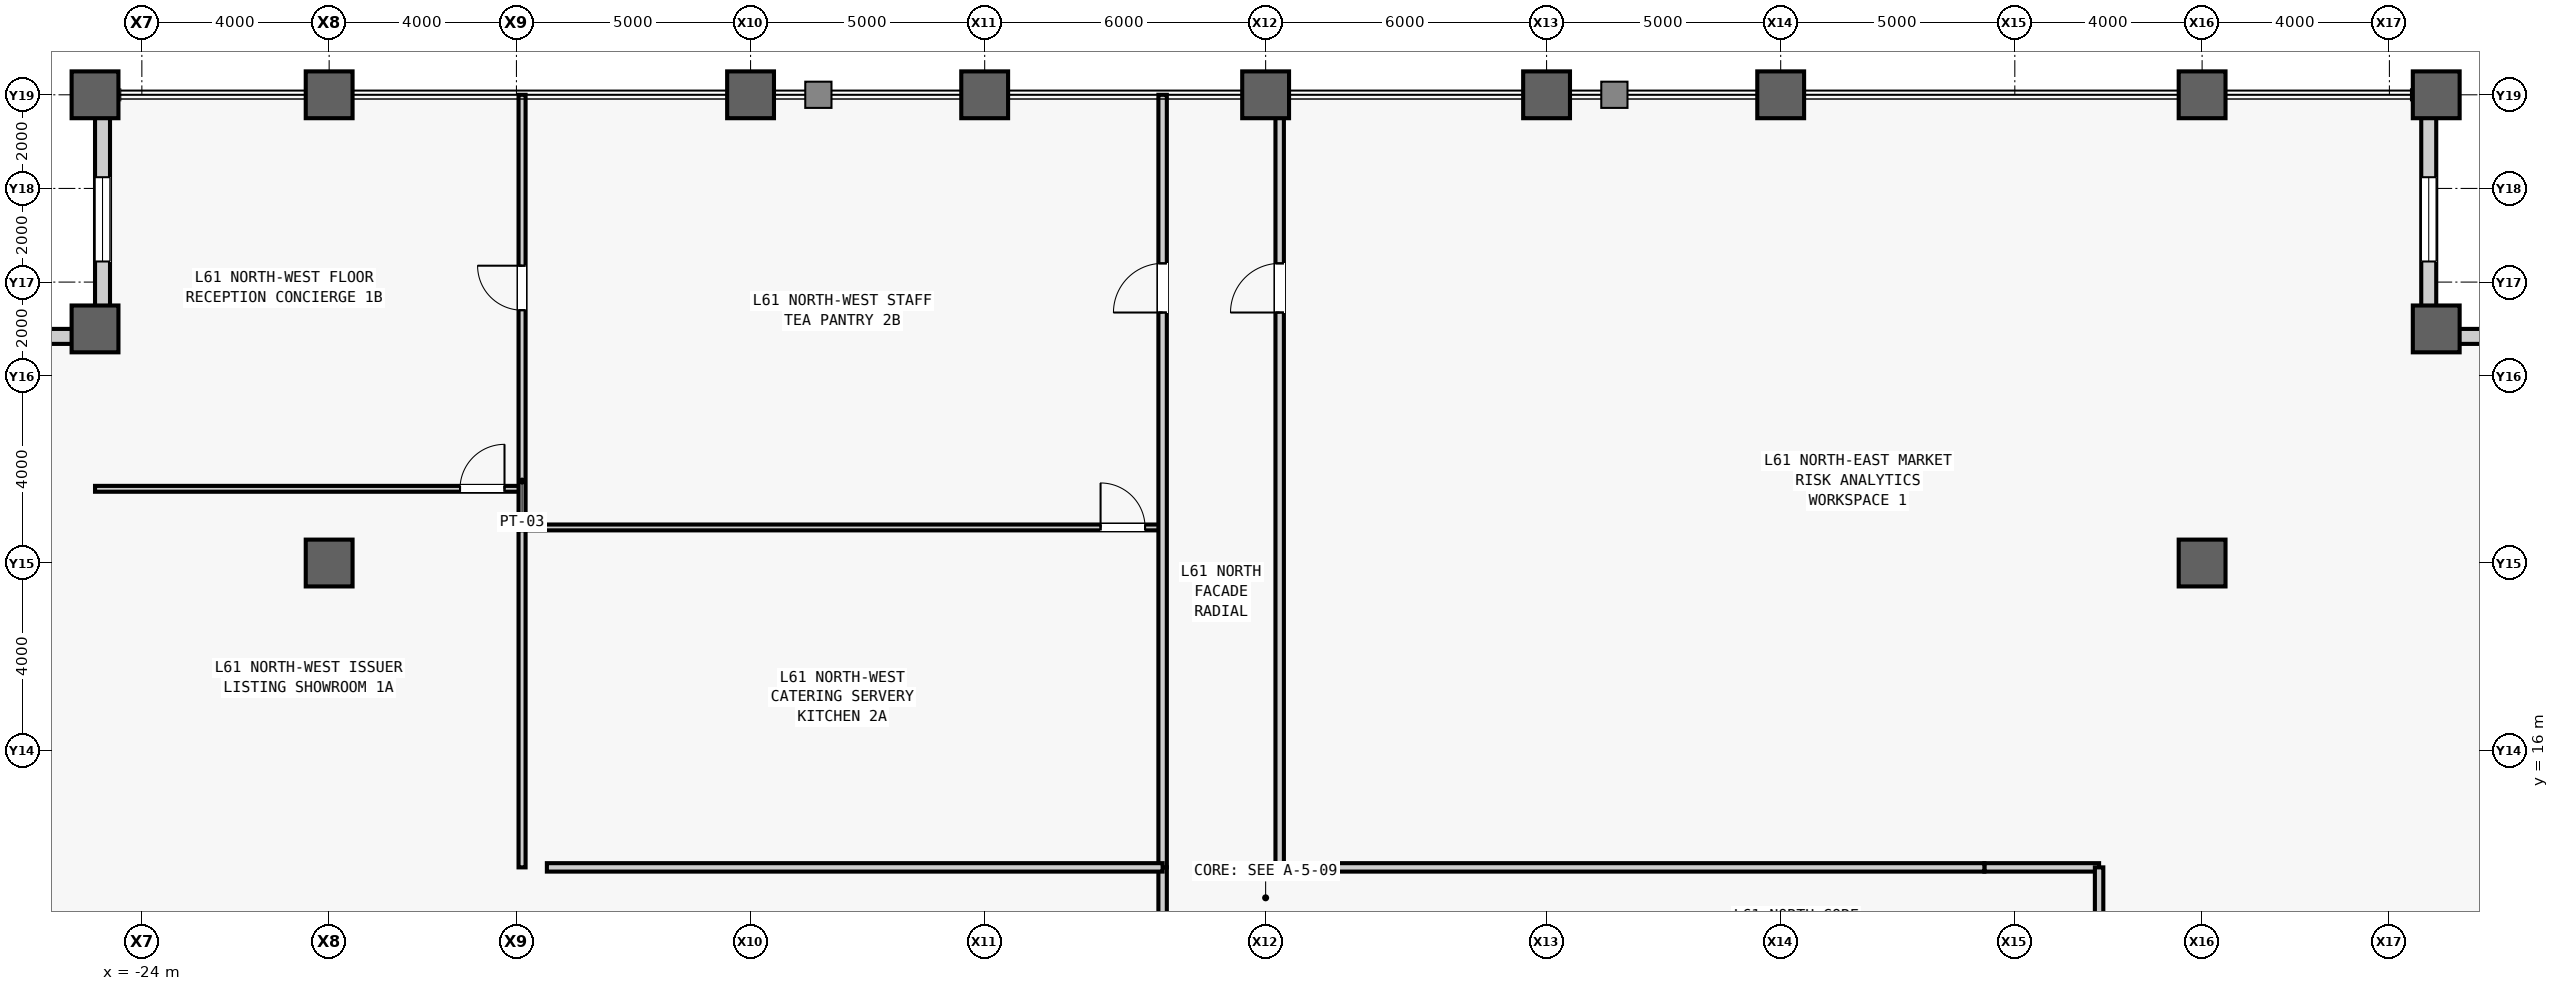
"""IFC4 building model, lengths in metres.
Left out: names, types, materials, properties, quantities, classifications, styles, units other than length and angle.
Written with IfcOpenShell. Run it as: python <this file> out.ifc"""

import sys

from ifc_helpers import new_model, si_unit, direction, frame, frame_2d, origin, origin_2d, place, context, subcontext, project, spatial, rectangle, hollow_rectangle, extrude, source, transform, mapped, element, fill, save


model = new_model("IFC4")
c1 = context("Model", 3, precision=1e-05, world=origin(), true_north=direction((0.0, 1.0)))
c2 = subcontext(c1, "Body", "Model", "MODEL_VIEW")
j1 = project(units=[si_unit("LENGTHUNIT", "METRE"), si_unit("PLANEANGLEUNIT", "RADIAN")], contexts=[c1])
p1 = place(None, origin())
s1 = spatial("IfcSite", under=j1, at=p1, CompositionType="ELEMENT")
p2 = place(p1, origin())
s2 = spatial("IfcBuilding", under=s1, at=p2, CompositionType="ELEMENT")
p3 = place(p2, frame((0.0, 0.0, 259.1)))
s3 = spatial("IfcBuildingStorey", under=s2, at=p3, CompositionType="ELEMENT", Elevation=259.1)
m1 = source(origin(), c2, "Body", "SweptSolid", [
    extrude(hollow_rectangle(XDim=1.0, YDim=1.0, WallThickness=0.055, at=origin_2d()), origin(), (0.0, 0.0, 1.0), 4.0),
])
for number, where, z_axis, x_axis in (
    (1, (-25.0, 25.0, 0.0), (0.0, 0.0, 1.0), (1.0, 0.0, 0.0)),
    (2, (-25.0, 30.0, 0.0), (0.0, 0.0, 1.0), (1.0, 0.0, 0.0)),
    (3, (-20.0, 20.0, 0.0), (0.0, 0.0, 1.0), (1.0, 0.0, 0.0)),
    (4, (-20.0, 30.0, 0.0), (0.0, 0.0, 1.0), (1.0, 0.0, 0.0)),
    (5, (-11.0, 30.0, 0.0), (0.0, 0.0, 1.0), (1.0, 0.0, 0.0)),
    (6, (-6.0, 30.0, 0.0), (0.0, 0.0, 1.0), (1.0, 0.0, 0.0)),
    (7, (0.0, 30.0, 0.0), (0.0, 0.0, 1.0), (1.0, 0.0, 0.0)),
    (8, (6.0, 30.0, 0.0), (0.0, 0.0, 1.0), (1.0, 0.0, 0.0)),
    (9, (11.0, 30.0, 0.0), (0.0, 0.0, 1.0), (1.0, 0.0, 0.0)),
    (10, (20.0, 20.0, 0.0), (0.0, 0.0, 1.0), (1.0, 0.0, 0.0)),
    (11, (20.0, 30.0, 0.0), (0.0, 0.0, 1.0), (1.0, 0.0, 0.0)),
    (12, (25.0, 25.0, 0.0), (0.0, 0.0, 1.0), (1.0, 0.0, 0.0)),
    (13, (25.0, 30.0, 0.0), (0.0, 0.0, 1.0), (1.0, 0.0, 0.0)),
):
    element("IfcColumn", number, at=place(p3, frame(where, z_axis=z_axis, x_axis=x_axis)), inside=s3, PredefinedType="COLUMN", context=c2, shape_type="MappedRepresentation", body=[
        mapped(m1, transform((0.0, 0.0, 0.0), scale=1.0)),
    ])
m2 = source(origin(), c2, "Body", "SweptSolid", [
    extrude(rectangle(XDim=4.68, YDim=0.32, at=frame_2d((2.34, 0.0))), origin(), (0.0, 0.0, 1.0), 3.164),
])
p4 = place(p3, frame((25.0, 24.84, 0.0), z_axis=(0.0, 0.0, 1.0), x_axis=(1.0, 0.0, 0.0)))
e14 = element("IfcWall", 14, at=p4, inside=s3, PredefinedType="STANDARD", context=c2, shape_type="MappedRepresentation", body=[
    mapped(m2, transform((0.0, 0.0, 0.0), scale=1.0)),
])
m3 = source(origin(), c2, "Body", "SweptSolid", [
    extrude(rectangle(XDim=1.8, YDim=2.4, at=frame_2d((0.9, 1.2))), frame((0.0, 0.17, 0.0), z_axis=(0.0, -1.0, 0.0), x_axis=(1.0, 0.0, 0.0)), (0.0, 0.0, 1.0), 0.34),
])
p5 = place(p4, frame((1.44, 0.0, 0.5)))
e15 = element("IfcOpeningElement", 15, at=p5, cuts=e14, PredefinedType="OPENING", context=c2, shape_type="MappedRepresentation", body=[
    mapped(m3, transform((0.0, 0.0, 0.0), scale=1.0)),
])
p6 = place(p3, frame((24.84, 25.0, 0.0), z_axis=(0.0, 0.0, 1.0), x_axis=(0.0, 1.0, 0.0)))
e16 = element("IfcWall", 16, at=p6, inside=s3, PredefinedType="STANDARD", context=c2, shape_type="MappedRepresentation", body=[
    mapped(m2, transform((0.0, 0.0, 0.0), scale=1.0)),
])
p7 = place(p6, frame((1.44, 0.0, 0.5)))
e17 = element("IfcOpeningElement", 17, at=p7, cuts=e16, PredefinedType="OPENING", context=c2, shape_type="MappedRepresentation", body=[
    mapped(m3, transform((0.0, 0.0, 0.0), scale=1.0)),
])
p8 = place(p3, frame((-24.84, 25.0, 0.0), z_axis=(0.0, 0.0, 1.0), x_axis=(0.0, 1.0, 0.0)))
e18 = element("IfcWall", 18, at=p8, inside=s3, PredefinedType="STANDARD", context=c2, shape_type="MappedRepresentation", body=[
    mapped(m2, transform((0.0, 0.0, 0.0), scale=1.0)),
])
p9 = place(p8, frame((1.44, 0.0, 0.5)))
e19 = element("IfcOpeningElement", 19, at=p9, cuts=e18, PredefinedType="OPENING", context=c2, shape_type="MappedRepresentation", body=[
    mapped(m3, transform((0.0, 0.0, 0.0), scale=1.0)),
])
p10 = place(p3, frame((-25.0, 24.84, 0.0), z_axis=(0.0, 0.0, 1.0), x_axis=(-1.0, 0.0, 0.0)))
e20 = element("IfcWall", 20, at=p10, inside=s3, PredefinedType="STANDARD", context=c2, shape_type="MappedRepresentation", body=[
    mapped(m2, transform((0.0, 0.0, 0.0), scale=1.0)),
])
p11 = place(p10, frame((1.44, 0.0, 0.5)))
e21 = element("IfcOpeningElement", 21, at=p11, cuts=e20, PredefinedType="OPENING", context=c2, shape_type="MappedRepresentation", body=[
    mapped(m3, transform((0.0, 0.0, 0.0), scale=1.0)),
])
m4 = source(origin(), c2, "Body", "SweptSolid", [
    extrude(rectangle(XDim=2.45, YDim=0.18, at=frame_2d((1.225, 0.0))), origin(), (0.0, 0.0, 1.0), 3.78),
])
p12 = place(p3, frame((15.35, 13.5, 0.0), z_axis=(0.0, 0.0, 1.0), x_axis=(1.0, 0.0, 0.0)))
e22 = element("IfcWall", 22, at=p12, inside=s3, PredefinedType="PARTITIONING", context=c2, shape_type="MappedRepresentation", body=[
    mapped(m4, transform((0.0, 0.0, 0.0), scale=1.0)),
])
m5 = source(origin(), c2, "Body", "SweptSolid", [
    extrude(rectangle(XDim=2.5, YDim=0.18, at=frame_2d((1.25, 0.0))), origin(), (0.0, 0.0, 1.0), 3.78),
])
p13 = place(p3, frame((-2.2, 11.0, 0.0), z_axis=(0.0, 0.0, 1.0), x_axis=(0.0, 1.0, 0.0)))
e23 = element("IfcWall", 23, at=p13, inside=s3, PredefinedType="PARTITIONING", context=c2, shape_type="MappedRepresentation", body=[
    mapped(m5, transform((0.0, 0.0, 0.0), scale=1.0)),
])
m6 = source(origin(), c2, "Body", "SweptSolid", [
    extrude(rectangle(XDim=9.12, YDim=0.125, at=frame_2d((4.56, 0.0))), origin(), (0.0, 0.0, 1.0), 3.78),
])
p14 = place(p3, frame((-25.0, 21.585, 0.0), z_axis=(0.0, 0.0, 1.0), x_axis=(1.0, 0.0, 0.0)))
e24 = element("IfcWall", 24, at=p14, inside=s3, PredefinedType="PARTITIONING", context=c2, shape_type="MappedRepresentation", body=[
    mapped(m6, transform((0.0, 0.0, 0.0), scale=1.0)),
])
m7 = source(origin(), c2, "Body", "SweptSolid", [
    extrude(rectangle(XDim=0.95, YDim=2.15, at=frame_2d((0.475, 1.075))), frame((0.0, 0.073, 0.0), z_axis=(0.0, -1.0, 0.0), x_axis=(1.0, 0.0, 0.0)), (0.0, 0.0, 1.0), 0.145),
])
p15 = place(p14, frame((7.795, 0.0, 0.0)))
e25 = element("IfcOpeningElement", 25, at=p15, cuts=e24, PredefinedType="OPENING", context=c2, shape_type="MappedRepresentation", body=[
    mapped(m7, transform((0.0, 0.0, 0.0), scale=1.0)),
])
m8 = source(origin(), c2, "Body", "SweptSolid", [
    extrude(rectangle(XDim=16.5, YDim=0.15, at=frame_2d((8.25, 0.0))), origin(), (0.0, 0.0, 1.0), 3.78),
])
p16 = place(p3, frame((-15.88, 13.5, 0.0), z_axis=(0.0, 0.0, 1.0), x_axis=(0.0, 1.0, 0.0)))
e26 = element("IfcWall", 26, at=p16, inside=s3, PredefinedType="PARTITIONING", context=c2, shape_type="MappedRepresentation", body=[
    mapped(m8, transform((0.0, 0.0, 0.0), scale=1.0)),
])
m9 = source(origin(), c2, "Body", "SweptSolid", [
    extrude(rectangle(XDim=0.95, YDim=2.15, at=frame_2d((0.475, 1.075))), frame((0.0, 0.085, 0.0), z_axis=(0.0, -1.0, 0.0), x_axis=(1.0, 0.0, 0.0)), (0.0, 0.0, 1.0), 0.17),
])
p17 = place(p16, frame((11.9, 0.0, 0.0)))
e27 = element("IfcOpeningElement", 27, at=p17, cuts=e26, PredefinedType="OPENING", context=c2, shape_type="MappedRepresentation", body=[
    mapped(m9, transform((0.0, 0.0, 0.0), scale=1.0)),
])
m10 = source(origin(), c2, "Body", "SweptSolid", [
    extrude(rectangle(XDim=13.68, YDim=0.125, at=frame_2d((6.84, 0.0))), origin(), (0.0, 0.0, 1.0), 3.78),
])
p18 = place(p3, frame((-15.88, 20.76, 0.0), z_axis=(0.0, 0.0, 1.0), x_axis=(1.0, 0.0, 0.0)))
e28 = element("IfcWall", 28, at=p18, inside=s3, PredefinedType="PARTITIONING", context=c2, shape_type="MappedRepresentation", body=[
    mapped(m10, transform((0.0, 0.0, 0.0), scale=1.0)),
])
p19 = place(p18, frame((12.355, 0.0, 0.0)))
e29 = element("IfcOpeningElement", 29, at=p19, cuts=e28, PredefinedType="OPENING", context=c2, shape_type="MappedRepresentation", body=[
    mapped(m7, transform((0.0, 0.0, 0.0), scale=1.0)),
])
m11 = source(origin(), c2, "Body", "SweptSolid", [
    extrude(rectangle(XDim=16.5, YDim=0.18, at=frame_2d((8.25, 0.0))), origin(), (0.0, 0.0, 1.0), 3.78),
])
p20 = place(p3, frame((-2.2, 13.5, 0.0), z_axis=(0.0, 0.0, 1.0), x_axis=(0.0, 1.0, 0.0)))
e30 = element("IfcWall", 30, at=p20, inside=s3, PredefinedType="PARTITIONING", context=c2, shape_type="MappedRepresentation", body=[
    mapped(m11, transform((0.0, 0.0, 0.0), scale=1.0)),
])
m12 = source(origin(), c2, "Body", "SweptSolid", [
    extrude(rectangle(XDim=1.05, YDim=2.2, at=frame_2d((0.525, 1.1))), frame((0.0, 0.1, 0.0), z_axis=(0.0, -1.0, 0.0), x_axis=(1.0, 0.0, 0.0)), (0.0, 0.0, 1.0), 0.2),
])
p21 = place(p20, frame((11.85, 0.0, 0.0)))
e31 = element("IfcOpeningElement", 31, at=p21, cuts=e30, PredefinedType="OPENING", context=c2, shape_type="MappedRepresentation", body=[
    mapped(m12, transform((0.0, 0.0, 0.0), scale=1.0)),
])
m13 = source(origin(), c2, "Body", "SweptSolid", [
    extrude(rectangle(XDim=13.15, YDim=0.18, at=frame_2d((6.575, 0.0))), origin(), (0.0, 0.0, 1.0), 3.78),
])
p22 = place(p3, frame((-15.35, 13.5, 0.0), z_axis=(0.0, 0.0, 1.0), x_axis=(1.0, 0.0, 0.0)))
e32 = element("IfcWall", 32, at=p22, inside=s3, PredefinedType="PARTITIONING", context=c2, shape_type="MappedRepresentation", body=[
    mapped(m13, transform((0.0, 0.0, 0.0), scale=1.0)),
])
m14 = source(origin(), c2, "Body", "SweptSolid", [
    extrude(rectangle(XDim=16.5, YDim=0.18, at=frame_2d((8.25, 0.0))), origin(), (0.0, 0.0, 1.0), 2.965),
])
p23 = place(p3, frame((0.3, 13.5, 0.0), z_axis=(0.0, 0.0, 1.0), x_axis=(0.0, 1.0, 0.0)))
e33 = element("IfcWall", 33, at=p23, inside=s3, PredefinedType="PARTITIONING", context=c2, shape_type="MappedRepresentation", body=[
    mapped(m14, transform((0.0, 0.0, 0.0), scale=1.0)),
])
p24 = place(p23, frame((11.85, 0.0, 0.0)))
e34 = element("IfcOpeningElement", 34, at=p24, cuts=e33, PredefinedType="OPENING", context=c2, shape_type="MappedRepresentation", body=[
    mapped(m12, transform((0.0, 0.0, 0.0), scale=1.0)),
])
m15 = source(origin(), c2, "Body", "SweptSolid", [
    extrude(rectangle(XDim=15.05, YDim=0.18, at=frame_2d((7.525, 0.0))), origin(), (0.0, 0.0, 1.0), 3.78),
])
p25 = place(p3, frame((0.3, 13.5, 0.0), z_axis=(0.0, 0.0, 1.0), x_axis=(1.0, 0.0, 0.0)))
e35 = element("IfcWall", 35, at=p25, inside=s3, PredefinedType="PARTITIONING", context=c2, shape_type="MappedRepresentation", body=[
    mapped(m15, transform((0.0, 0.0, 0.0), scale=1.0)),
])
m16 = source(origin(), c2, "Body", "SweptSolid", [
    extrude(rectangle(XDim=14.65, YDim=0.18, at=frame_2d((7.325, 0.0))), origin(), (0.0, 0.0, 1.0), 3.78),
])
p26 = place(p3, frame((17.8, -1.15, 0.0), z_axis=(0.0, 0.0, 1.0), x_axis=(0.0, 1.0, 0.0)))
e36 = element("IfcWall", 36, at=p26, inside=s3, PredefinedType="PARTITIONING", context=c2, shape_type="MappedRepresentation", body=[
    mapped(m16, transform((0.0, 0.0, 0.0), scale=1.0)),
])
m17 = source(origin(), c2, "Body", "SweptSolid", [
    extrude(rectangle(XDim=1.8, YDim=2.4, at=frame_2d((0.9, 1.2))), frame((0.0, 0.03, 0.0), z_axis=(0.0, -1.0, 0.0), x_axis=(1.0, 0.0, 0.0)), (0.0, 0.0, 1.0), 0.06),
])
p27 = place(p7, origin())
e37 = element("IfcWindow", 37, at=p27, inside=s3, PartitioningType="SINGLE_PANEL", PredefinedType="WINDOW", context=c2, shape_type="MappedRepresentation", body=[
    mapped(m17, transform((0.0, 0.0, 0.0), scale=1.0)),
])
fill(e17, e37)
p28 = place(p9, origin())
e38 = element("IfcWindow", 38, at=p28, inside=s3, PartitioningType="SINGLE_PANEL", PredefinedType="WINDOW", context=c2, shape_type="MappedRepresentation", body=[
    mapped(m17, transform((0.0, 0.0, 0.0), scale=1.0)),
])
fill(e19, e38)
m18 = source(origin(), c2, "Body", "SweptSolid", [
    extrude(rectangle(XDim=0.95, YDim=2.15, at=frame_2d((0.475, 1.075))), frame((0.0, 0.025, 0.0), z_axis=(0.0, -1.0, 0.0), x_axis=(1.0, 0.0, 0.0)), (0.0, 0.0, 1.0), 0.05),
])
p29 = place(p15, origin())
e39 = element("IfcDoor", 39, at=p29, inside=s3, OperationType="SINGLE_SWING_RIGHT", PredefinedType="DOOR", context=c2, shape_type="MappedRepresentation", body=[
    mapped(m18, transform((0.0, 0.0, 0.0), scale=1.0)),
])
fill(e25, e39)
p30 = place(p17, origin())
e40 = element("IfcDoor", 40, at=p30, inside=s3, OperationType="SINGLE_SWING_RIGHT", PredefinedType="DOOR", context=c2, shape_type="MappedRepresentation", body=[
    mapped(m18, transform((0.0, 0.0, 0.0), scale=1.0)),
])
fill(e27, e40)
p31 = place(p19, origin())
e41 = element("IfcDoor", 41, at=p31, inside=s3, OperationType="SINGLE_SWING_LEFT", PredefinedType="DOOR", context=c2, shape_type="MappedRepresentation", body=[
    mapped(m18, transform((0.0, 0.0, 0.0), scale=1.0)),
])
fill(e29, e41)
m19 = source(origin(), c2, "Body", "SweptSolid", [
    extrude(rectangle(XDim=1.05, YDim=2.2, at=frame_2d((0.525, 1.1))), frame((0.0, 0.025, 0.0), z_axis=(0.0, -1.0, 0.0), x_axis=(1.0, 0.0, 0.0)), (0.0, 0.0, 1.0), 0.05),
])
p32 = place(p21, origin())
e42 = element("IfcDoor", 42, at=p32, inside=s3, OperationType="SINGLE_SWING_LEFT", PredefinedType="DOOR", context=c2, shape_type="MappedRepresentation", body=[
    mapped(m19, transform((0.0, 0.0, 0.0), scale=1.0)),
])
fill(e31, e42)
p33 = place(p24, origin())
e43 = element("IfcDoor", 43, at=p33, inside=s3, OperationType="SINGLE_SWING_LEFT", PredefinedType="DOOR", context=c2, shape_type="MappedRepresentation", body=[
    mapped(m19, transform((0.0, 0.0, 0.0), scale=1.0)),
])
fill(e34, e43)
save(model, sys.argv[1])
